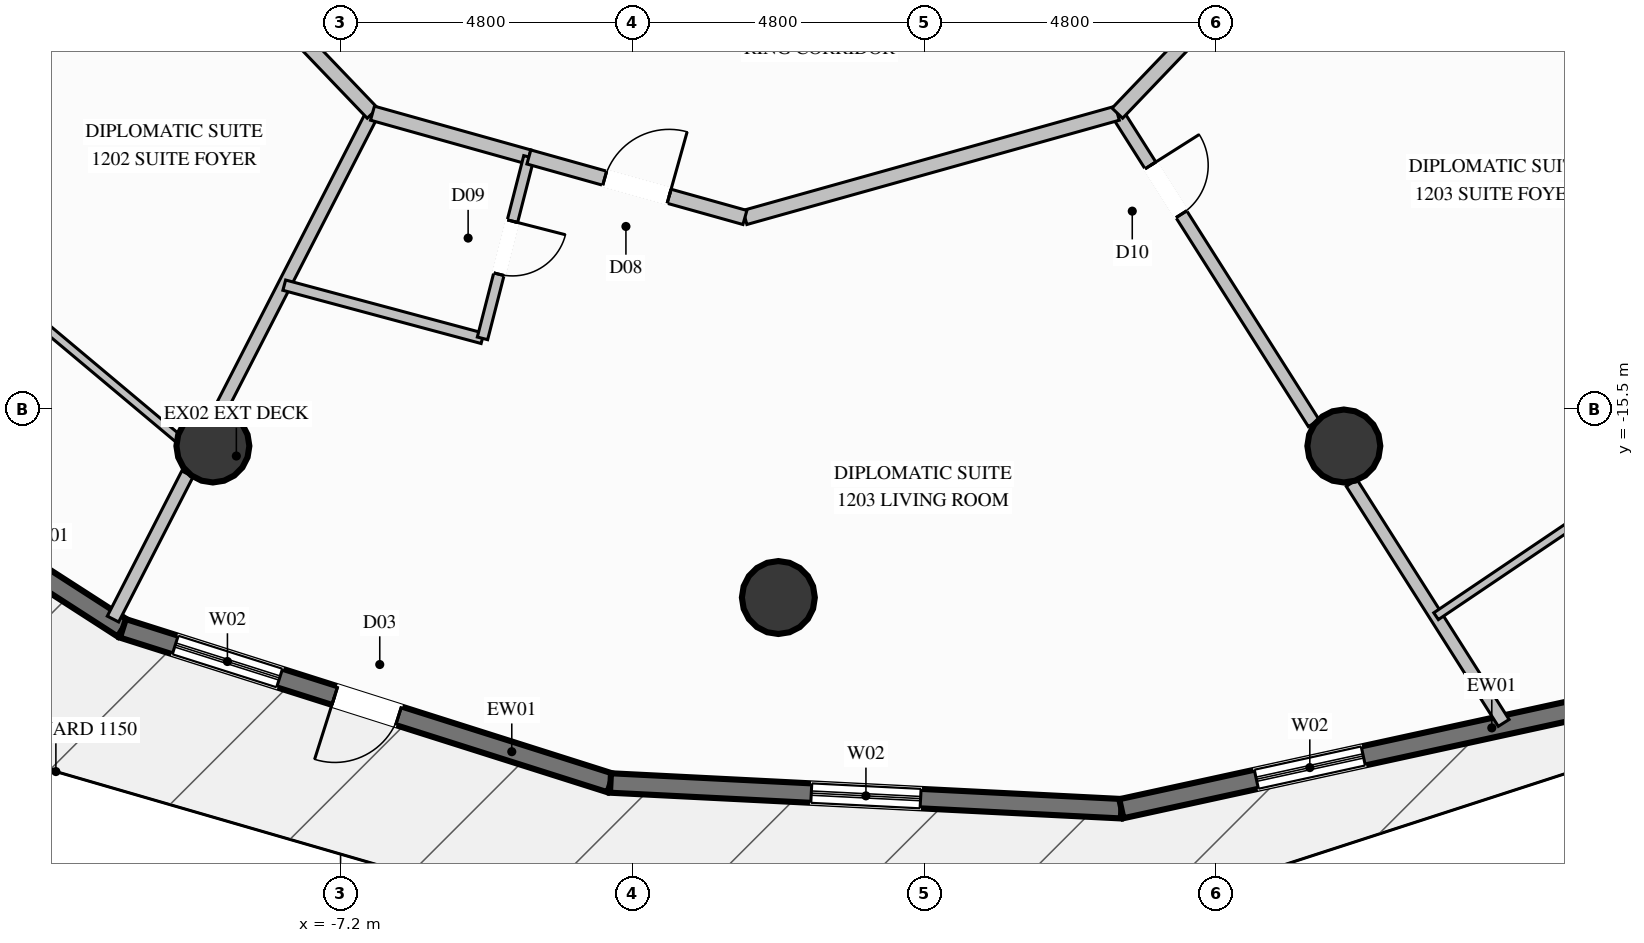
"""IFC4 building model, lengths in metres.
Left out: names, types, materials, properties, quantities, classifications, styles, units other than length and angle.
Written with IfcOpenShell. Run it as: python <this file> out.ifc"""

import sys

from ifc_helpers import new_model, si_unit, direction, frame, frame_2d, origin, origin_2d, place, context, subcontext, project, spatial, rectangle, circle, extrude, element, fill, save


model = new_model("IFC4")
c1 = context("Model", 3, precision=1e-05, world=origin(), true_north=direction((0.0, 1.0)))
c2 = subcontext(c1, "Body", "Model", "MODEL_VIEW")
j1 = project(units=[si_unit("LENGTHUNIT", "METRE"), si_unit("PLANEANGLEUNIT", "RADIAN")], contexts=[c1])
p1 = place(None, origin())
s1 = spatial("IfcSite", under=j1, at=p1, CompositionType="ELEMENT")
p2 = place(p1, origin())
s2 = spatial("IfcBuilding", under=s1, at=p2, CompositionType="ELEMENT")
p3 = place(p2, frame((0.0, 0.0, 46.4)))
s3 = spatial("IfcBuildingStorey", under=s2, at=p3, CompositionType="ELEMENT", Elevation=46.4)
for number, where, z_axis, x_axis in (
    (1, (-9.3, -16.108, 0.0), (0.0, 0.0, 1.0), (1.0, 0.0, 0.0)),
    (2, (0.0, -18.6, 0.0), (0.0, 0.0, 1.0), (1.0, 0.0, 0.0)),
    (3, (9.3, -16.108, 0.0), (0.0, 0.0, 1.0), (1.0, 0.0, 0.0)),
):
    element("IfcColumn", number, at=place(p3, frame(where, z_axis=z_axis, x_axis=x_axis)), inside=s3, PredefinedType="COLUMN", context=c2, shape_type="SweptSolid", body=[
        extrude(circle(Radius=0.6, at=origin_2d()), origin(), (0.0, 0.0, 1.0), 3.6),
    ])
p4 = place(p3, frame((-10.78, -19.107, 0.0), z_axis=(0.0, 0.0, 1.0), x_axis=(-0.840699239941, 0.541502343451, 0.0)))
e4 = element("IfcWall", 4, at=p4, inside=s3, PredefinedType="SOLIDWALL", context=c2, shape_type="SweptSolid", body=[
    extrude(rectangle(XDim=8.149, YDim=0.32, at=frame_2d((4.075, 0.0))), origin(), (0.0, 0.0, 1.0), 3.34),
])
p5 = place(p4, frame((3.335, 0.0, 0.35)))
e5 = element("IfcOpeningElement", 5, at=p5, cuts=e4, PredefinedType="OPENING", context=c2, shape_type="SweptSolid", body=[
    extrude(rectangle(XDim=1.8, YDim=2.6, at=frame_2d((0.9, 1.3))), frame((0.0, 0.17, 0.0), z_axis=(0.0, -1.0, 0.0), x_axis=(1.0, 0.0, 0.0)), (0.0, 0.0, 1.0), 0.34),
])
p6 = place(p3, frame((-2.761, -21.65, 0.0), z_axis=(0.0, 0.0, 1.0), x_axis=(-0.953218809013, 0.302281164059, 0.0)))
e6 = element("IfcWall", 6, at=p6, inside=s3, PredefinedType="SOLIDWALL", context=c2, shape_type="SweptSolid", body=[
    extrude(rectangle(XDim=8.413, YDim=0.32, at=frame_2d((4.206, 0.0))), origin(), (0.0, 0.0, 1.0), 3.34),
])
p7 = place(p6, frame((5.709, 0.0, 0.35)))
e7 = element("IfcOpeningElement", 7, at=p7, cuts=e6, PredefinedType="OPENING", context=c2, shape_type="SweptSolid", body=[
    extrude(rectangle(XDim=1.8, YDim=2.6, at=frame_2d((0.9, 1.3))), frame((0.0, 0.17, 0.0), z_axis=(0.0, -1.0, 0.0), x_axis=(1.0, 0.0, 0.0)), (0.0, 0.0, 1.0), 0.34),
])
p8 = place(p6, frame((3.656, 0.0, 0.0)))
e8 = element("IfcOpeningElement", 8, at=p8, cuts=e6, PredefinedType="OPENING", context=c2, shape_type="SweptSolid", body=[
    extrude(rectangle(XDim=1.1, YDim=2.2, at=frame_2d((0.55, 1.1))), frame((0.0, 0.17, 0.0), z_axis=(0.0, -1.0, 0.0), x_axis=(1.0, 0.0, 0.0)), (0.0, 0.0, 1.0), 0.34),
])
p9 = place(p3, frame((5.641, -22.073, 0.0), z_axis=(0.0, 0.0, 1.0), x_axis=(-0.998734545301, 0.050292226268, 0.0)))
e9 = element("IfcWall", 9, at=p9, inside=s3, PredefinedType="SOLIDWALL", context=c2, shape_type="SweptSolid", body=[
    extrude(rectangle(XDim=8.413, YDim=0.32, at=frame_2d((4.207, 0.0))), origin(), (0.0, 0.0, 1.0), 3.34),
])
p10 = place(p9, frame((3.306, 0.0, 0.35)))
e10 = element("IfcOpeningElement", 10, at=p10, cuts=e9, PredefinedType="OPENING", context=c2, shape_type="SweptSolid", body=[
    extrude(rectangle(XDim=1.8, YDim=2.6, at=frame_2d((0.9, 1.3))), frame((0.0, 0.17, 0.0), z_axis=(0.0, -1.0, 0.0), x_axis=(1.0, 0.0, 0.0)), (0.0, 0.0, 1.0), 0.34),
])
p11 = place(p3, frame((13.603, -20.336, 0.0), z_axis=(0.0, 0.0, 1.0), x_axis=(-0.977017916809, -0.213157196066, 0.0)))
e11 = element("IfcWall", 11, at=p11, inside=s3, PredefinedType="SOLIDWALL", context=c2, shape_type="SweptSolid", body=[
    extrude(rectangle(XDim=8.149, YDim=0.32, at=frame_2d((4.075, 0.0))), origin(), (0.0, 0.0, 1.0), 3.34),
])
p12 = place(p11, frame((4.077, 0.0, 0.35)))
e12 = element("IfcOpeningElement", 12, at=p12, cuts=e11, PredefinedType="OPENING", context=c2, shape_type="SweptSolid", body=[
    extrude(rectangle(XDim=1.8, YDim=2.6, at=frame_2d((0.9, 1.3))), frame((0.0, 0.17, 0.0), z_axis=(0.0, -1.0, 0.0), x_axis=(1.0, 0.0, 0.0)), (0.0, 0.0, 1.0), 0.34),
])
p13 = place(p3, frame((-6.675, -10.635, 0.0), z_axis=(0.0, 0.0, 1.0), x_axis=(-0.456563129712, -0.889691018605, 0.0)))
e13 = element("IfcWall", 13, at=p13, inside=s3, PredefinedType="PARTITIONING", context=c2, shape_type="SweptSolid", body=[
    extrude(rectangle(XDim=5.469, YDim=0.21, at=frame_2d((2.735, 0.0))), origin(), (0.0, 0.0, 1.0), 2.709),
])
p14 = place(p3, frame((-9.718, -16.566, 0.0), z_axis=(0.0, 0.0, 1.0), x_axis=(-0.456431135396, -0.889758741818, 0.0)))
e14 = element("IfcWall", 14, at=p14, inside=s3, PredefinedType="PARTITIONING", context=c2, shape_type="SweptSolid", body=[
    extrude(rectangle(XDim=2.684, YDim=0.21, at=frame_2d((1.342, 0.0))), origin(), (0.0, 0.0, 1.0), 3.34),
])
p15 = place(p3, frame((5.575, -10.635, 0.0), z_axis=(0.0, 0.0, 1.0), x_axis=(0.535249320239, -0.844694125222, 0.0)))
e15 = element("IfcWall", 15, at=p15, inside=s3, PredefinedType="PARTITIONING", context=c2, shape_type="SweptSolid", body=[
    extrude(rectangle(XDim=6.036, YDim=0.21, at=frame_2d((3.018, 0.0))), origin(), (0.0, 0.0, 1.0), 2.709),
])
p16 = place(p15, frame((1.017, 0.0, 0.0)))
e16 = element("IfcOpeningElement", 16, at=p16, cuts=e15, PredefinedType="OPENING", context=c2, shape_type="SweptSolid", body=[
    extrude(rectangle(XDim=0.95, YDim=2.1, at=frame_2d((0.475, 1.05))), frame((0.0, 0.115, 0.0), z_axis=(0.0, -1.0, 0.0), x_axis=(1.0, 0.0, 0.0)), (0.0, 0.0, 1.0), 0.23),
])
p17 = place(p3, frame((9.428, -16.715, 0.0), z_axis=(0.0, 0.0, 1.0), x_axis=(0.535234793796, -0.84470332988, 0.0)))
e17 = element("IfcWall", 17, at=p17, inside=s3, PredefinedType="PARTITIONING", context=c2, shape_type="SweptSolid", body=[
    extrude(rectangle(XDim=4.673, YDim=0.21, at=frame_2d((2.336, 0.0))), origin(), (0.0, 0.0, 1.0), 3.34),
])
p18 = place(p3, frame((-11.159, -5.95, 0.0), z_axis=(0.0, 0.0, 1.0), x_axis=(0.691426053968, -0.722447238138, 0.0)))
e18 = element("IfcWall", 18, at=p18, inside=s3, PredefinedType="PARTITIONING", context=c2, shape_type="SweptSolid", body=[
    extrude(rectangle(XDim=6.485, YDim=0.24, at=frame_2d((3.242, 0.0))), origin(), (0.0, 0.0, 1.0), 3.34),
])
p19 = place(p3, frame((-17.251, -9.8, 0.0), z_axis=(0.0, 0.0, 1.0), x_axis=(0.766386533377, -0.642379701935, 0.0)))
e19 = element("IfcWall", 19, at=p19, inside=s3, PredefinedType="PARTITIONING", context=c2, shape_type="SweptSolid", body=[
    extrude(rectangle(XDim=10.041, YDim=0.135, at=frame_2d((5.021, 0.0))), origin(), (0.0, 0.0, 1.0), 2.792),
])
p20 = place(p19, frame((4.545, 0.0, 0.0)))
e20 = element("IfcOpeningElement", 20, at=p20, cuts=e19, PredefinedType="OPENING", context=c2, shape_type="SweptSolid", body=[
    extrude(rectangle(XDim=0.95, YDim=2.1, at=frame_2d((0.475, 1.05))), frame((0.0, 0.078, 0.0), z_axis=(0.0, -1.0, 0.0), x_axis=(1.0, 0.0, 0.0)), (0.0, 0.0, 1.0), 0.155),
])
p21 = place(p3, frame((-6.675, -10.635, 0.0), z_axis=(0.0, 0.0, 1.0), x_axis=(0.962983004146, -0.269562114782, 0.0)))
e21 = element("IfcWall", 21, at=p21, inside=s3, PredefinedType="PARTITIONING", context=c2, shape_type="SweptSolid", body=[
    extrude(rectangle(XDim=2.671, YDim=0.24, at=frame_2d((1.335, 0.0))), origin(), (0.0, 0.0, 1.0), 3.34),
])
p22 = place(p3, frame((-8.126, -13.463, 0.0), z_axis=(0.0, 0.0, 1.0), x_axis=(0.965815899111, -0.259228950978, 0.0)))
e22 = element("IfcWall", 22, at=p22, inside=s3, PredefinedType="PLUMBINGWALL", context=c2, shape_type="SweptSolid", body=[
    extrude(rectangle(XDim=3.375, YDim=0.175, at=frame_2d((1.688, 0.0))), origin(), (0.0, 0.0, 1.0), 3.34),
])
p23 = place(p3, frame((-4.103, -11.355, 0.0), z_axis=(0.0, 0.0, 1.0), x_axis=(-0.24779344182, -0.96881288709, 0.0)))
e23 = element("IfcWall", 23, at=p23, inside=s3, PredefinedType="PLUMBINGWALL", context=c2, shape_type="SweptSolid", body=[
    extrude(rectangle(XDim=3.079, YDim=0.175, at=frame_2d((1.54, 0.0))), origin(), (0.0, 0.0, 1.0), 3.34),
])
p24 = place(p23, frame((1.09, 0.0, 0.0)))
e24 = element("IfcOpeningElement", 24, at=p24, cuts=e23, PredefinedType="OPENING", context=c2, shape_type="SweptSolid", body=[
    extrude(rectangle(XDim=0.9, YDim=2.1, at=frame_2d((0.45, 1.05))), frame((0.0, 0.098, 0.0), z_axis=(0.0, -1.0, 0.0), x_axis=(1.0, 0.0, 0.0)), (0.0, 0.0, 1.0), 0.195),
])
p25 = place(p3, frame((-0.55, -12.35, 0.0), z_axis=(0.0, 0.0, 1.0), x_axis=(0.962960431872, 0.269642738915, 0.0)))
e25 = element("IfcWall", 25, at=p25, inside=s3, PredefinedType="PARTITIONING", context=c2, shape_type="SweptSolid", body=[
    extrude(rectangle(XDim=6.361, YDim=0.24, at=frame_2d((3.18, 0.0))), origin(), (0.0, 0.0, 1.0), 3.34),
])
p26 = place(p3, frame((-4.103, -11.355, 0.0), z_axis=(0.0, 0.0, 1.0), x_axis=(0.962944088122, -0.269701099648, 0.0)))
e26 = element("IfcWall", 26, at=p26, inside=s3, PredefinedType="PARTITIONING", context=c2, shape_type="SweptSolid", body=[
    extrude(rectangle(XDim=3.69, YDim=0.24, at=frame_2d((1.845, 0.0))), origin(), (0.0, 0.0, 1.0), 3.34),
])
p27 = place(p26, frame((1.295, 0.0, 0.0)))
e27 = element("IfcOpeningElement", 27, at=p27, cuts=e26, PredefinedType="OPENING", context=c2, shape_type="SweptSolid", body=[
    extrude(rectangle(XDim=1.1, YDim=2.3, at=frame_2d((0.55, 1.15))), frame((0.0, 0.13, 0.0), z_axis=(0.0, -1.0, 0.0), x_axis=(1.0, 0.0, 0.0)), (0.0, 0.0, 1.0), 0.26),
])
p28 = place(p3, frame((5.575, -10.635, 0.0), z_axis=(0.0, 0.0, 1.0), x_axis=(0.691445702336, 0.722428432941, 0.0)))
e28 = element("IfcWall", 28, at=p28, inside=s3, PredefinedType="PARTITIONING", context=c2, shape_type="SweptSolid", body=[
    extrude(rectangle(XDim=6.485, YDim=0.24, at=frame_2d((3.243, 0.0))), origin(), (0.0, 0.0, 1.0), 3.34),
])
p29 = place(p3, frame((10.817, -18.907, 0.0), z_axis=(0.0, 0.0, 1.0), x_axis=(0.828865179629, 0.559448401551, 0.0)))
e29 = element("IfcWall", 29, at=p29, inside=s3, PredefinedType="PARTITIONING", context=c2, shape_type="SweptSolid", body=[
    extrude(rectangle(XDim=12.175, YDim=0.135, at=frame_2d((6.087, 0.0))), origin(), (0.0, 0.0, 1.0), 3.34),
])
p30 = place(p29, frame((5.612, 0.0, 0.0)))
e30 = element("IfcOpeningElement", 30, at=p30, cuts=e29, PredefinedType="OPENING", context=c2, shape_type="SweptSolid", body=[
    extrude(rectangle(XDim=0.95, YDim=2.1, at=frame_2d((0.475, 1.05))), frame((0.0, 0.078, 0.0), z_axis=(0.0, -1.0, 0.0), x_axis=(1.0, 0.0, 0.0)), (0.0, 0.0, 1.0), 0.155),
])
p31 = place(p7, origin())
e31 = element("IfcWindow", 31, at=p31, inside=s3, PartitioningType="SINGLE_PANEL", PredefinedType="WINDOW", context=c2, shape_type="SweptSolid", body=[
    extrude(rectangle(XDim=1.8, YDim=2.6, at=frame_2d((0.9, 1.3))), frame((0.0, 0.03, 0.0), z_axis=(0.0, -1.0, 0.0), x_axis=(1.0, 0.0, 0.0)), (0.0, 0.0, 1.0), 0.06),
])
fill(e7, e31)
p32 = place(p8, origin())
e32 = element("IfcDoor", 32, at=p32, inside=s3, OperationType="SINGLE_SWING_RIGHT", PredefinedType="DOOR", context=c2, shape_type="SweptSolid", body=[
    extrude(rectangle(XDim=1.1, YDim=2.2, at=frame_2d((0.55, 1.1))), frame((0.0, 0.025, 0.0), z_axis=(0.0, -1.0, 0.0), x_axis=(1.0, 0.0, 0.0)), (0.0, 0.0, 1.0), 0.05),
])
fill(e8, e32)
p33 = place(p10, origin())
e33 = element("IfcWindow", 33, at=p33, inside=s3, PartitioningType="SINGLE_PANEL", PredefinedType="WINDOW", context=c2, shape_type="SweptSolid", body=[
    extrude(rectangle(XDim=1.8, YDim=2.6, at=frame_2d((0.9, 1.3))), frame((0.0, 0.03, 0.0), z_axis=(0.0, -1.0, 0.0), x_axis=(1.0, 0.0, 0.0)), (0.0, 0.0, 1.0), 0.06),
])
fill(e10, e33)
p34 = place(p12, origin())
e34 = element("IfcWindow", 34, at=p34, inside=s3, PartitioningType="SINGLE_PANEL", PredefinedType="WINDOW", context=c2, shape_type="SweptSolid", body=[
    extrude(rectangle(XDim=1.8, YDim=2.6, at=frame_2d((0.9, 1.3))), frame((0.0, 0.03, 0.0), z_axis=(0.0, -1.0, 0.0), x_axis=(1.0, 0.0, 0.0)), (0.0, 0.0, 1.0), 0.06),
])
fill(e12, e34)
p35 = place(p24, origin())
e35 = element("IfcDoor", 35, at=p35, inside=s3, OperationType="SINGLE_SWING_LEFT", PredefinedType="DOOR", context=c2, shape_type="SweptSolid", body=[
    extrude(rectangle(XDim=0.9, YDim=2.1, at=frame_2d((0.45, 1.05))), frame((0.0, 0.025, 0.0), z_axis=(0.0, -1.0, 0.0), x_axis=(1.0, 0.0, 0.0)), (0.0, 0.0, 1.0), 0.05),
])
fill(e24, e35)
p36 = place(p27, origin())
e36 = element("IfcDoor", 36, at=p36, inside=s3, OperationType="SINGLE_SWING_RIGHT", PredefinedType="DOOR", context=c2, shape_type="SweptSolid", body=[
    extrude(rectangle(XDim=1.1, YDim=2.3, at=frame_2d((0.55, 1.15))), frame((0.0, 0.025, 0.0), z_axis=(0.0, -1.0, 0.0), x_axis=(1.0, 0.0, 0.0)), (0.0, 0.0, 1.0), 0.05),
])
fill(e27, e36)
p37 = place(p16, origin())
e37 = element("IfcDoor", 37, at=p37, inside=s3, OperationType="SINGLE_SWING_LEFT", PredefinedType="DOOR", context=c2, shape_type="SweptSolid", body=[
    extrude(rectangle(XDim=0.95, YDim=2.1, at=frame_2d((0.475, 1.05))), frame((0.0, 0.025, 0.0), z_axis=(0.0, -1.0, 0.0), x_axis=(1.0, 0.0, 0.0)), (0.0, 0.0, 1.0), 0.05),
])
fill(e16, e37)
save(model, sys.argv[1])
